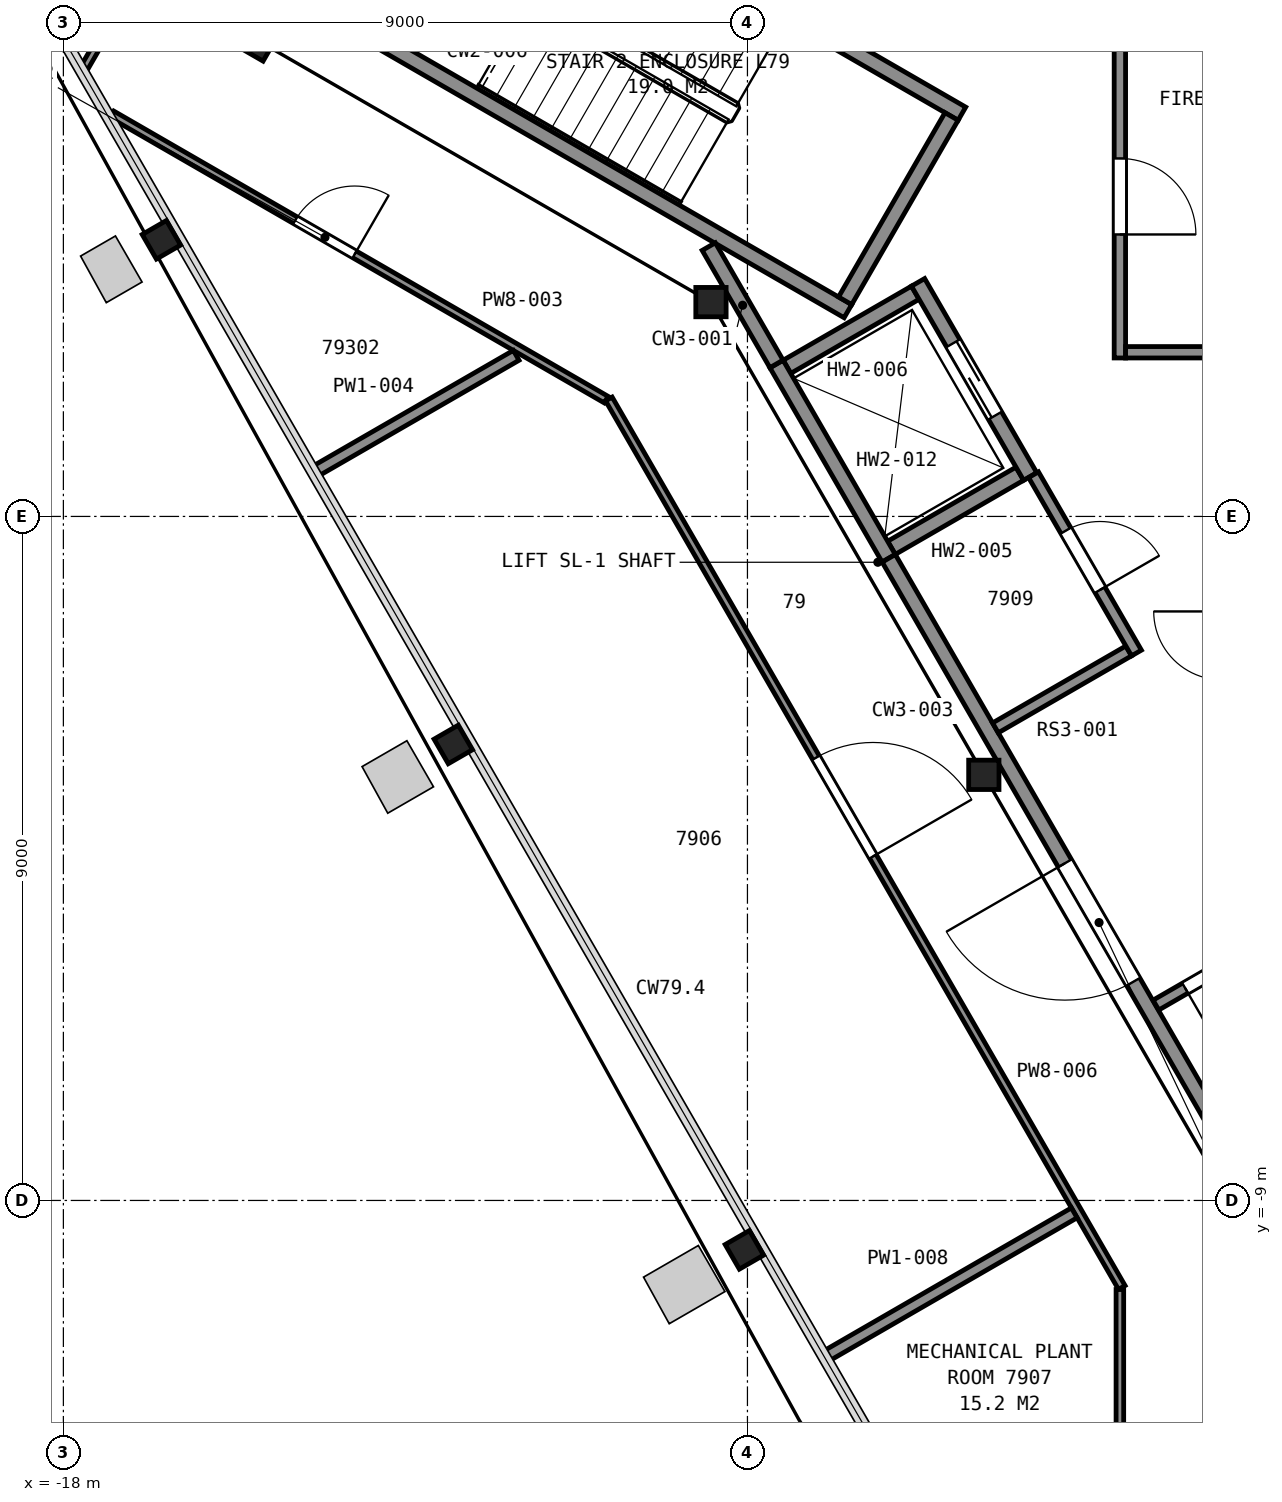
"""IFC4 building model, lengths in metres.
Left out: names, types, materials, properties, quantities, classifications, styles, units other than length and angle.
Written with IfcOpenShell. Run it as: python <this file> out.ifc"""

import sys

from ifc_helpers import new_model, si_unit, direction, frame, frame_2d, origin, origin_2d, place, context, subcontext, project, spatial, rectangle, i_section, extrude, element, fill, save


model = new_model("IFC4")
c1 = context("Model", 3, precision=1e-05, world=origin(), true_north=direction((0.0, 1.0)))
c2 = subcontext(c1, "Body", "Model", "MODEL_VIEW")
j1 = project(units=[si_unit("LENGTHUNIT", "METRE"), si_unit("PLANEANGLEUNIT", "RADIAN")], contexts=[c1])
p1 = place(None, origin())
s1 = spatial("IfcSite", under=j1, at=p1, CompositionType="ELEMENT")
p2 = place(p1, origin())
s2 = spatial("IfcBuilding", under=s1, at=p2, CompositionType="ELEMENT")
p3 = place(p2, frame((0.0, 0.0, 312.6)))
s3 = spatial("IfcBuildingStorey", under=s2, at=p3, CompositionType="ELEMENT", Elevation=312.6)
for number, where, z_axis, x_axis in (
    (1, (-16.71, 3.64, 0.0), (0.0, 0.0, 1.0), (-0.5, 0.866, 0.0)),
    (2, (-12.87, -3.0, 0.0), (0.0, 0.0, 1.0), (-0.5, 0.866, 0.0)),
    (3, (-9.04, -9.65, 0.0), (0.0, 0.0, 1.0), (-0.5, 0.866, 0.0)),
):
    element("IfcColumn", number, at=place(p3, frame(where, z_axis=z_axis, x_axis=x_axis)), inside=s3, PredefinedType="COLUMN", context=c2, shape_type="SweptSolid", body=[
        extrude(i_section(OverallWidth=0.373, OverallDepth=0.368, WebThickness=0.015, FlangeThickness=0.024, FilletRadius=0.015, at=origin_2d()), origin(), (0.0, 0.0, 1.0), 4.2),
    ])
for number, where, z_axis, x_axis in (
    (4, (-15.44, 6.26, 0.0), (0.0, 0.0, 1.0), (0.5, 0.866, 0.0)),
    (5, (-9.48, 2.82, 0.0), (0.0, 0.0, 1.0), (1.0, 0.0, 0.0)),
    (6, (-5.89, -3.4, 0.0), (0.0, 0.0, 1.0), (1.0, 0.0, 0.0)),
):
    element("IfcColumn", number, at=place(p3, frame(where, z_axis=z_axis, x_axis=x_axis)), inside=s3, PredefinedType="COLUMN", context=c2, shape_type="SweptSolid", body=[
        extrude(i_section(OverallWidth=0.399, OverallDepth=0.386, WebThickness=0.021, FlangeThickness=0.033, FilletRadius=0.015, at=origin_2d()), origin(), (0.0, 0.0, 1.0), 4.2),
    ])
for number, where, z_axis, x_axis in (
    (7, (-7.678, 2.701, 0.0), (0.0, 0.0, 1.0), (-0.866, 0.5, 0.0)),
    (8, (-6.178, 5.299, 0.0), (0.0, 0.0, 1.0), (-0.866, 0.5, 0.0)),
):
    element("IfcWall", number, at=place(p3, frame(where, z_axis=z_axis, x_axis=x_axis)), inside=s3, PredefinedType="PARTITIONING", context=c2, shape_type="SweptSolid", body=[
        extrude(rectangle(XDim=7.2, YDim=0.2, at=frame_2d((3.6, 0.0))), origin(), (0.0, 0.0, 1.0), 3.95),
    ])
p4 = place(p3, frame((-6.315, 5.262, 0.0), z_axis=(0.0, 0.0, 1.0), x_axis=(-0.500049511043, -0.865996816683, 0.0)))
e9 = element("IfcWall", 9, at=p4, inside=s3, PredefinedType="PARTITIONING", context=c2, shape_type="SweptSolid", body=[
    extrude(rectangle(XDim=2.8, YDim=0.2, at=frame_2d((1.4, 0.0))), origin(), (0.0, 0.0, 1.0), 3.95),
])
for number, where, z_axis, x_axis in (
    (10, (-7.105, -0.413, 0.0), (0.0, 0.0, 1.0), (0.866, 0.5, 0.0)),
    (11, (-8.48, 1.969, 0.0), (0.0, 0.0, 1.0), (0.866, 0.5, 0.0)),
):
    element("IfcWall", number, at=place(p3, frame(where, z_axis=z_axis, x_axis=x_axis)), inside=s3, PredefinedType="PARTITIONING", context=c2, shape_type="SweptSolid", body=[
        extrude(rectangle(XDim=1.95, YDim=0.2, at=frame_2d((0.975, 0.0))), origin(), (0.0, 0.0, 1.0), 4.2),
    ])
p5 = place(p3, frame((-5.28, 0.525, 0.0), z_axis=(0.0, 0.0, 1.0), x_axis=(-0.500037662692, 0.866003658127, 0.0)))
e12 = element("IfcWall", 12, at=p5, inside=s3, PredefinedType="PARTITIONING", context=c2, shape_type="SweptSolid", body=[
    extrude(rectangle(XDim=2.95, YDim=0.2, at=frame_2d((1.475, 0.0))), origin(), (0.0, 0.0, 1.0), 4.2),
])
p6 = place(p5, frame((0.925, 0.0, 0.0)))
e13 = element("IfcOpeningElement", 13, at=p6, cuts=e12, PredefinedType="OPENING", context=c2, shape_type="SweptSolid", body=[
    extrude(rectangle(XDim=1.1, YDim=2.1, at=frame_2d((0.55, 1.05))), frame((0.0, 0.11, 0.0), z_axis=(0.0, -1.0, 0.0), x_axis=(1.0, 0.0, 0.0)), (0.0, 0.0, 1.0), 0.22),
])
p7 = place(p3, frame((-7.142, -0.55, 0.0), z_axis=(0.0, 0.0, 1.0), x_axis=(-0.49997559174, 0.866039495442, 0.0)))
e14 = element("IfcWall", 14, at=p7, inside=s3, PredefinedType="PARTITIONING", context=c2, shape_type="SweptSolid", body=[
    extrude(rectangle(XDim=2.95, YDim=0.2, at=frame_2d((1.475, 0.0))), origin(), (0.0, 0.0, 1.0), 4.2),
])
p8 = place(p3, frame((-9.509, 3.551, 0.0), z_axis=(0.0, 0.0, 1.0), x_axis=(0.499999136801, -0.866025902152, 0.0)))
e15 = element("IfcWall", 15, at=p8, inside=s3, PredefinedType="PARTITIONING", context=c2, shape_type="SweptSolid", body=[
    extrude(rectangle(XDim=1.782, YDim=0.2, at=frame_2d((0.891, 0.0))), origin(), (0.0, 0.0, 1.0), 3.95),
])
p9 = place(p3, frame((-7.141, -0.551, 0.0), z_axis=(0.0, 0.0, 1.0), x_axis=(0.499992795234, -0.866029563418, 0.0)))
e16 = element("IfcWall", 16, at=p9, inside=s3, PredefinedType="PARTITIONING", context=c2, shape_type="SweptSolid", body=[
    extrude(rectangle(XDim=9.198, YDim=0.2, at=frame_2d((4.599, 0.0))), origin(), (0.0, 0.0, 1.0), 3.95),
])
p10 = place(p9, frame((4.634, 0.0, 0.0)))
e17 = element("IfcOpeningElement", 17, at=p10, cuts=e16, PredefinedType="OPENING", context=c2, shape_type="SweptSolid", body=[
    extrude(rectangle(XDim=1.8, YDim=2.1, at=frame_2d((0.9, 1.05))), frame((0.0, 0.11, 0.0), z_axis=(0.0, -1.0, 0.0), x_axis=(1.0, 0.0, 0.0)), (0.0, 0.0, 1.0), 0.22),
])
p11 = place(p3, frame((-5.737, -2.782, 0.0), z_axis=(0.0, 0.0, 1.0), x_axis=(0.866000843773, 0.500042536776, 0.0)))
e18 = element("IfcWall", 18, at=p11, inside=s3, PredefinedType="PARTITIONING", context=c2, shape_type="SweptSolid", body=[
    extrude(rectangle(XDim=2.025, YDim=0.15, at=frame_2d((1.012, 0.0))), origin(), (0.0, 0.0, 1.0), 3.95),
])
p12 = place(p3, frame((-3.882, -1.797, 0.0), z_axis=(0.0, 0.0, 1.0), x_axis=(-0.500016307898, 0.86601598821, 0.0)))
e19 = element("IfcWall", 19, at=p12, inside=s3, PredefinedType="PARTITIONING", context=c2, shape_type="SweptSolid", body=[
    extrude(rectangle(XDim=2.709, YDim=0.15, at=frame_2d((1.354, 0.0))), origin(), (0.0, 0.0, 1.0), 3.95),
])
p13 = place(p12, frame((0.959, 0.0, 0.0)))
e20 = element("IfcOpeningElement", 20, at=p13, cuts=e19, PredefinedType="OPENING", context=c2, shape_type="SweptSolid", body=[
    extrude(rectangle(XDim=0.9, YDim=2.1, at=frame_2d((0.45, 1.05))), frame((0.0, 0.085, 0.0), z_axis=(0.0, -1.0, 0.0), x_axis=(1.0, 0.0, 0.0)), (0.0, 0.0, 1.0), 0.17),
])
p14 = place(p3, frame((-4.1, 2.085, 0.0), z_axis=(0.0, 0.0, 1.0), x_axis=(0.0, 1.0, 0.0)))
e21 = element("IfcWall", 21, at=p14, inside=s3, PredefinedType="PARTITIONING", context=c2, shape_type="SweptSolid", body=[
    extrude(rectangle(XDim=4.23, YDim=0.15, at=frame_2d((2.115, 0.0))), origin(), (0.0, 0.0, 1.0), 3.95),
])
p15 = place(p14, frame((1.625, 0.0, 0.0)))
e22 = element("IfcOpeningElement", 22, at=p15, cuts=e21, PredefinedType="OPENING", context=c2, shape_type="SweptSolid", body=[
    extrude(rectangle(XDim=1.0, YDim=2.1, at=frame_2d((0.5, 1.05))), frame((0.0, 0.085, 0.0), z_axis=(0.0, -1.0, 0.0), x_axis=(1.0, 0.0, 0.0)), (0.0, 0.0, 1.0), 0.17),
])
p16 = place(p3, frame((-4.025, 2.16, 0.0), z_axis=(0.0, 0.0, 1.0), x_axis=(1.0, 0.0, 0.0)))
e23 = element("IfcWall", 23, at=p16, inside=s3, PredefinedType="PARTITIONING", context=c2, shape_type="SweptSolid", body=[
    extrude(rectangle(XDim=1.238, YDim=0.15, at=frame_2d((0.619, 0.0))), origin(), (0.0, 0.0, 1.0), 3.95),
])
p17 = place(p3, frame((-1.963, -5.469, 0.0), z_axis=(0.0, 0.0, 1.0), x_axis=(-0.866043720474, -0.49996827322, 0.0)))
e24 = element("IfcWall", 24, at=p17, inside=s3, PredefinedType="PARTITIONING", context=c2, shape_type="SweptSolid", body=[
    extrude(rectangle(XDim=1.92, YDim=0.15, at=frame_2d((0.96, 0.0))), origin(), (0.0, 0.0, 1.0), 3.95),
])
p18 = place(p17, frame((0.575, 0.0, 0.0)))
e25 = element("IfcOpeningElement", 25, at=p18, cuts=e24, PredefinedType="OPENING", context=c2, shape_type="SweptSolid", body=[
    extrude(rectangle(XDim=0.9, YDim=2.1, at=frame_2d((0.45, 1.05))), frame((0.0, 0.085, 0.0), z_axis=(0.0, -1.0, 0.0), x_axis=(1.0, 0.0, 0.0)), (0.0, 0.0, 1.0), 0.17),
])
p19 = place(p3, frame((-17.73, 5.894, 0.0), z_axis=(0.0, 0.0, 1.0), x_axis=(0.500350572687, 0.865822905918, 0.0)))
e26 = element("IfcWall", 26, at=p19, inside=s3, PredefinedType="PARTITIONING", context=c2, shape_type="SweptSolid", body=[
    extrude(rectangle(XDim=7.524, YDim=0.1, at=frame_2d((3.762, 0.0))), origin(), (0.0, 0.0, 1.0), 3.297),
])
p20 = place(p19, frame((5.496, 0.0, 0.0)))
e27 = element("IfcOpeningElement", 27, at=p20, cuts=e26, PredefinedType="OPENING", context=c2, shape_type="SweptSolid", body=[
    extrude(rectangle(XDim=1.2, YDim=2.1, at=frame_2d((0.6, 1.05))), frame((0.0, 0.06, 0.0), z_axis=(0.0, -1.0, 0.0), x_axis=(1.0, 0.0, 0.0)), (0.0, 0.0, 1.0), 0.12),
])
p21 = place(p19, frame((1.779, 0.0, 0.0)))
e28 = element("IfcOpeningElement", 28, at=p21, cuts=e26, PredefinedType="OPENING", context=c2, shape_type="SweptSolid", body=[
    extrude(rectangle(XDim=1.5, YDim=2.1, at=frame_2d((0.75, 1.05))), frame((0.0, 0.06, 0.0), z_axis=(0.0, -1.0, 0.0), x_axis=(1.0, 0.0, 0.0)), (0.0, 0.0, 1.0), 0.12),
])
p22 = place(p3, frame((-10.859, 1.537, 0.0), z_axis=(0.0, 0.0, 1.0), x_axis=(-0.866105995393, 0.499860385252, 0.0)))
e29 = element("IfcWall", 29, at=p22, inside=s3, PredefinedType="PARTITIONING", context=c2, shape_type="SweptSolid", body=[
    extrude(rectangle(XDim=7.508, YDim=0.1, at=frame_2d((3.754, 0.0))), origin(), (0.0, 0.0, 1.0), 3.297),
])
p23 = place(p22, frame((3.822, 0.0, 0.0)))
e30 = element("IfcOpeningElement", 30, at=p23, cuts=e29, PredefinedType="OPENING", context=c2, shape_type="SweptSolid", body=[
    extrude(rectangle(XDim=0.9, YDim=2.1, at=frame_2d((0.45, 1.05))), frame((0.0, 0.06, 0.0), z_axis=(0.0, -1.0, 0.0), x_axis=(1.0, 0.0, 0.0)), (0.0, 0.0, 1.0), 0.12),
])
p24 = place(p3, frame((-14.696, 0.588, 0.0), z_axis=(0.0, 0.0, 1.0), x_axis=(0.866116586143, 0.499842034255, 0.0)))
e31 = element("IfcWall", 31, at=p24, inside=s3, PredefinedType="PARTITIONING", context=c2, shape_type="SweptSolid", body=[
    extrude(rectangle(XDim=3.063, YDim=0.15, at=frame_2d((1.532, 0.0))), origin(), (0.0, 0.0, 1.0), 3.297),
])
p25 = place(p3, frame((-4.075, -10.145, 0.0), z_axis=(0.0, 0.0, 1.0), x_axis=(-0.499912942625, 0.866075660549, 0.0)))
e32 = element("IfcWall", 32, at=p25, inside=s3, PredefinedType="PARTITIONING", context=c2, shape_type="SweptSolid", body=[
    extrude(rectangle(XDim=13.499, YDim=0.1, at=frame_2d((6.749, 0.0))), origin(), (0.0, 0.0, 1.0), 3.297),
])
p26 = place(p25, frame((6.548, 0.0, 0.0)))
e33 = element("IfcOpeningElement", 33, at=p26, cuts=e32, PredefinedType="OPENING", context=c2, shape_type="SweptSolid", body=[
    extrude(rectangle(XDim=1.5, YDim=2.1, at=frame_2d((0.75, 1.05))), frame((0.0, 0.06, 0.0), z_axis=(0.0, -1.0, 0.0), x_axis=(1.0, 0.0, 0.0)), (0.0, 0.0, 1.0), 0.12),
])
p27 = place(p3, frame((-7.975, -11.054, 0.0), z_axis=(0.0, 0.0, 1.0), x_axis=(0.865981276422, 0.500076423046, 0.0)))
e34 = element("IfcWall", 34, at=p27, inside=s3, PredefinedType="PARTITIONING", context=c2, shape_type="SweptSolid", body=[
    extrude(rectangle(XDim=3.781, YDim=0.15, at=frame_2d((1.891, 0.0))), origin(), (0.0, 0.0, 1.0), 3.297),
])
p28 = place(p3, frame((-4.1, -17.68, 0.0), z_axis=(0.0, 0.0, 1.0), x_axis=(0.0, 1.0, 0.0)))
e35 = element("IfcWall", 35, at=p28, inside=s3, PredefinedType="PARTITIONING", context=c2, shape_type="SweptSolid", body=[
    extrude(rectangle(XDim=7.508, YDim=0.1, at=frame_2d((3.754, 0.0))), origin(), (0.0, 0.0, 1.0), 3.297),
])
p29 = place(p28, frame((3.137, 0.0, 0.0)))
e36 = element("IfcOpeningElement", 36, at=p29, cuts=e35, PredefinedType="OPENING", context=c2, shape_type="SweptSolid", body=[
    extrude(rectangle(XDim=1.5, YDim=2.1, at=frame_2d((0.75, 1.05))), frame((0.0, 0.06, 0.0), z_axis=(0.0, -1.0, 0.0), x_axis=(1.0, 0.0, 0.0)), (0.0, 0.0, 1.0), 0.12),
])
p30 = place(p6, origin())
e37 = element("IfcDoor", 37, at=p30, inside=s3, OperationType="SLIDING_TO_LEFT", PredefinedType="DOOR", context=c2, shape_type="SweptSolid", body=[
    extrude(rectangle(XDim=1.1, YDim=2.1, at=frame_2d((0.55, 1.05))), frame((0.0, 0.025, 0.0), z_axis=(0.0, -1.0, 0.0), x_axis=(1.0, 0.0, 0.0)), (0.0, 0.0, 1.0), 0.05),
])
fill(e13, e37)
p31 = place(p10, origin())
e38 = element("IfcDoor", 38, at=p31, inside=s3, OperationType="DOUBLE_DOOR_SINGLE_SWING", PredefinedType="DOOR", context=c2, shape_type="SweptSolid", body=[
    extrude(rectangle(XDim=1.8, YDim=2.1, at=frame_2d((0.9, 1.05))), frame((0.0, 0.025, 0.0), z_axis=(0.0, -1.0, 0.0), x_axis=(1.0, 0.0, 0.0)), (0.0, 0.0, 1.0), 0.05),
])
fill(e17, e38)
p32 = place(p13, origin())
e39 = element("IfcDoor", 39, at=p32, inside=s3, OperationType="SINGLE_SWING_LEFT", PredefinedType="DOOR", context=c2, shape_type="SweptSolid", body=[
    extrude(rectangle(XDim=0.9, YDim=2.1, at=frame_2d((0.45, 1.05))), frame((0.0, 0.025, 0.0), z_axis=(0.0, -1.0, 0.0), x_axis=(1.0, 0.0, 0.0)), (0.0, 0.0, 1.0), 0.05),
])
fill(e20, e39)
p33 = place(p15, origin())
e40 = element("IfcDoor", 40, at=p33, inside=s3, OperationType="SINGLE_SWING_LEFT", PredefinedType="DOOR", context=c2, shape_type="SweptSolid", body=[
    extrude(rectangle(XDim=1.0, YDim=2.1, at=frame_2d((0.5, 1.05))), frame((0.0, 0.025, 0.0), z_axis=(0.0, -1.0, 0.0), x_axis=(1.0, 0.0, 0.0)), (0.0, 0.0, 1.0), 0.05),
])
fill(e22, e40)
p34 = place(p18, origin())
e41 = element("IfcDoor", 41, at=p34, inside=s3, OperationType="SINGLE_SWING_RIGHT", PredefinedType="DOOR", context=c2, shape_type="SweptSolid", body=[
    extrude(rectangle(XDim=0.9, YDim=2.1, at=frame_2d((0.45, 1.05))), frame((0.0, 0.025, 0.0), z_axis=(0.0, -1.0, 0.0), x_axis=(1.0, 0.0, 0.0)), (0.0, 0.0, 1.0), 0.05),
])
fill(e25, e41)
p35 = place(p23, origin())
e42 = element("IfcDoor", 42, at=p35, inside=s3, OperationType="SINGLE_SWING_LEFT", PredefinedType="DOOR", context=c2, shape_type="SweptSolid", body=[
    extrude(rectangle(XDim=0.9, YDim=2.1, at=frame_2d((0.45, 1.05))), frame((0.0, 0.025, 0.0), z_axis=(0.0, -1.0, 0.0), x_axis=(1.0, 0.0, 0.0)), (0.0, 0.0, 1.0), 0.05),
])
fill(e30, e42)
p36 = place(p26, origin())
e43 = element("IfcDoor", 43, at=p36, inside=s3, OperationType="DOUBLE_DOOR_SINGLE_SWING", PredefinedType="DOOR", context=c2, shape_type="SweptSolid", body=[
    extrude(rectangle(XDim=1.5, YDim=2.1, at=frame_2d((0.75, 1.05))), frame((0.0, 0.025, 0.0), z_axis=(0.0, -1.0, 0.0), x_axis=(1.0, 0.0, 0.0)), (0.0, 0.0, 1.0), 0.05),
])
fill(e33, e43)
save(model, sys.argv[1])
